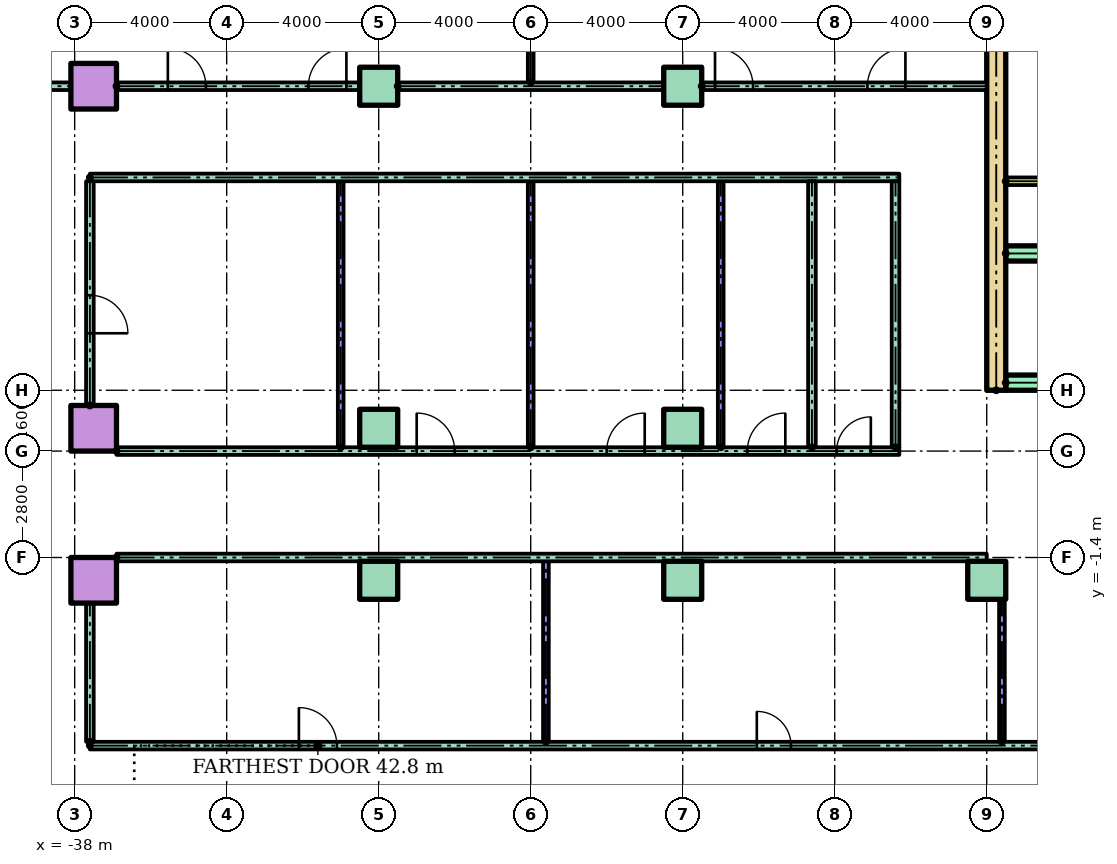
"""IFC4 building model, lengths in metres.
Left out: names, types, materials, properties, quantities, classifications, styles, units other than length and angle.
Written with IfcOpenShell. Run it as: python <this file> out.ifc"""

import sys

from ifc_helpers import new_model, si_unit, direction, frame, frame_2d, origin, origin_2d, place, context, subcontext, project, spatial, rectangle, hollow_rectangle, extrude, element, fill, save


model = new_model("IFC4")
c1 = context("Model", 3, precision=1e-05, world=origin(), true_north=direction((0.0, 1.0)))
c2 = subcontext(c1, "Body", "Model", "MODEL_VIEW")
j1 = project(units=[si_unit("LENGTHUNIT", "METRE"), si_unit("PLANEANGLEUNIT", "RADIAN")], contexts=[c1])
p1 = place(None, origin())
s1 = spatial("IfcSite", under=j1, at=p1, CompositionType="ELEMENT")
p2 = place(p1, origin())
s2 = spatial("IfcBuilding", under=s1, at=p2, CompositionType="ELEMENT")
p3 = place(p2, frame((0.0, 0.0, 22.0)))
s3 = spatial("IfcBuildingStorey", under=s2, at=p3, CompositionType="ELEMENT", Elevation=22.0)
p4 = place(p3, frame((-37.5, -2.0, 0.0)))
e1 = element("IfcColumn", 1, at=p4, inside=s3, PredefinedType="COLUMN", context=c2, shape_type="SweptSolid", body=[
    extrude(hollow_rectangle(XDim=1.2, YDim=1.2, WallThickness=0.06, at=origin_2d()), origin(), (0.0, 0.0, 1.0), 4.0),
])
for number, where in (
    (2, (-30.0, -2.0, 0.0)),
    (3, (-22.0, -2.0, 0.0)),
    (4, (-14.0, -2.0, 0.0)),
):
    element("IfcColumn", number, at=place(p3, frame(where)), inside=s3, PredefinedType="COLUMN", context=c2, shape_type="SweptSolid", body=[
        extrude(rectangle(XDim=1.0, YDim=1.0, at=origin_2d()), origin(), (0.0, 0.0, 1.0), 4.0),
    ])
p5 = place(p3, frame((-37.5, 2.0, 0.0)))
e5 = element("IfcColumn", 5, at=p5, inside=s3, PredefinedType="COLUMN", context=c2, shape_type="SweptSolid", body=[
    extrude(hollow_rectangle(XDim=1.2, YDim=1.2, WallThickness=0.06, at=origin_2d()), origin(), (0.0, 0.0, 1.0), 4.0),
])
for number, where in (
    (6, (-30.0, 2.0, 0.0)),
    (7, (-22.0, 2.0, 0.0)),
):
    element("IfcColumn", number, at=place(p3, frame(where)), inside=s3, PredefinedType="COLUMN", context=c2, shape_type="SweptSolid", body=[
        extrude(rectangle(XDim=1.0, YDim=1.0, at=origin_2d()), origin(), (0.0, 0.0, 1.0), 4.0),
    ])
p6 = place(p3, frame((-37.5, 11.0, 0.0)))
e8 = element("IfcColumn", 8, at=p6, inside=s3, PredefinedType="COLUMN", context=c2, shape_type="SweptSolid", body=[
    extrude(hollow_rectangle(XDim=1.2, YDim=1.2, WallThickness=0.06, at=origin_2d()), origin(), (0.0, 0.0, 1.0), 4.0),
])
for number, where in (
    (9, (-30.0, 11.0, 0.0)),
    (10, (-22.0, 11.0, 0.0)),
):
    element("IfcColumn", number, at=place(p3, frame(where)), inside=s3, PredefinedType="COLUMN", context=c2, shape_type="SweptSolid", body=[
        extrude(rectangle(XDim=1.0, YDim=1.0, at=origin_2d()), origin(), (0.0, 0.0, 1.0), 4.0),
    ])
p7 = place(p3, frame((-13.75, 3.0, 0.0), z_axis=(0.0, 0.0, 1.0), x_axis=(0.0, 1.0, 0.0)))
e11 = element("IfcWall", 11, at=p7, inside=s3, PredefinedType="SHEAR", context=c2, shape_type="SweptSolid", body=[
    extrude(rectangle(XDim=17.0, YDim=0.5, at=frame_2d((8.5, 0.0))), origin(), (0.0, 0.0, 1.0), 3.2),
])
p8 = place(p3, frame((-13.5, 3.2, 0.0)))
e12 = element("IfcWall", 12, at=p8, inside=s3, PredefinedType="SHEAR", context=c2, shape_type="SweptSolid", body=[
    extrude(rectangle(XDim=27.0, YDim=0.4, at=frame_2d((13.5, 0.0))), origin(), (0.0, 0.0, 1.0), 3.2),
])
p9 = place(p8, frame((6.861, 0.0, 0.0)))
e13 = element("IfcOpeningElement", 13, at=p9, cuts=e12, PredefinedType="OPENING", context=c2, shape_type="SweptSolid", body=[
    extrude(rectangle(XDim=1.1, YDim=2.1, at=frame_2d((0.55, 1.05))), frame((0.0, 0.21, 0.0), z_axis=(0.0, -1.0, 0.0), x_axis=(1.0, 0.0, 0.0)), (0.0, 0.0, 1.0), 0.42),
])
p10 = place(p8, frame((9.906, 0.0, 0.0)))
e14 = element("IfcOpeningElement", 14, at=p10, cuts=e12, PredefinedType="OPENING", context=c2, shape_type="SweptSolid", body=[
    extrude(rectangle(XDim=1.1, YDim=2.1, at=frame_2d((0.55, 1.05))), frame((0.0, 0.21, 0.0), z_axis=(0.0, -1.0, 0.0), x_axis=(1.0, 0.0, 0.0)), (0.0, 0.0, 1.0), 0.42),
])
p11 = place(p8, frame((15.994, 0.0, 0.0)))
e15 = element("IfcOpeningElement", 15, at=p11, cuts=e12, PredefinedType="OPENING", context=c2, shape_type="SweptSolid", body=[
    extrude(rectangle(XDim=1.1, YDim=2.1, at=frame_2d((0.55, 1.05))), frame((0.0, 0.21, 0.0), z_axis=(0.0, -1.0, 0.0), x_axis=(1.0, 0.0, 0.0)), (0.0, 0.0, 1.0), 0.42),
])
p12 = place(p8, frame((19.039, 0.0, 0.0)))
e16 = element("IfcOpeningElement", 16, at=p12, cuts=e12, PredefinedType="OPENING", context=c2, shape_type="SweptSolid", body=[
    extrude(rectangle(XDim=1.1, YDim=2.1, at=frame_2d((0.55, 1.05))), frame((0.0, 0.21, 0.0), z_axis=(0.0, -1.0, 0.0), x_axis=(1.0, 0.0, 0.0)), (0.0, 0.0, 1.0), 0.42),
])
p13 = place(p8, frame((12.6, 0.0, 0.0)))
e17 = element("IfcOpeningElement", 17, at=p13, cuts=e12, PredefinedType="OPENING", context=c2, shape_type="SweptSolid", body=[
    extrude(rectangle(XDim=1.8, YDim=2.1, at=frame_2d((0.9, 1.05))), frame((0.0, 0.21, 0.0), z_axis=(0.0, -1.0, 0.0), x_axis=(1.0, 0.0, 0.0)), (0.0, 0.0, 1.0), 0.42),
])
p14 = place(p3, frame((-13.5, 6.6, 0.0)))
e18 = element("IfcWall", 18, at=p14, inside=s3, PredefinedType="SHEAR", context=c2, shape_type="SweptSolid", body=[
    extrude(rectangle(XDim=11.978, YDim=0.4, at=frame_2d((5.989, 0.0))), origin(), (0.0, 0.0, 1.0), 3.2),
])
p15 = place(p3, frame((-13.5, 8.5, 0.0)))
e19 = element("IfcWall", 19, at=p15, inside=s3, PredefinedType="PARTITIONING", context=c2, shape_type="SweptSolid", body=[
    extrude(rectangle(XDim=3.9, YDim=0.2, at=frame_2d((1.95, 0.0))), origin(), (0.0, 0.0, 1.0), 3.2),
])
p16 = place(p3, frame((-37.6, -6.35, 0.0)))
e20 = element("IfcWall", 20, at=p16, inside=s3, PredefinedType="PARTITIONING", context=c2, shape_type="SweptSolid", body=[
    extrude(rectangle(XDim=75.2, YDim=0.2, at=frame_2d((37.6, 0.0))), origin(), (0.0, 0.0, 1.0), 3.2),
])
p17 = place(p16, frame((5.5, 0.0, 0.0)))
e21 = element("IfcOpeningElement", 21, at=p17, cuts=e20, PredefinedType="OPENING", context=c2, shape_type="SweptSolid", body=[
    extrude(rectangle(XDim=1.0, YDim=2.1, at=frame_2d((0.5, 1.05))), frame((0.0, 0.11, 0.0), z_axis=(0.0, -1.0, 0.0), x_axis=(1.0, 0.0, 0.0)), (0.0, 0.0, 1.0), 0.22),
])
p18 = place(p16, frame((17.55, 0.0, 0.0)))
e22 = element("IfcOpeningElement", 22, at=p18, cuts=e20, PredefinedType="OPENING", context=c2, shape_type="SweptSolid", body=[
    extrude(rectangle(XDim=0.9, YDim=2.1, at=frame_2d((0.45, 1.05))), frame((0.0, 0.11, 0.0), z_axis=(0.0, -1.0, 0.0), x_axis=(1.0, 0.0, 0.0)), (0.0, 0.0, 1.0), 0.22),
])
p19 = place(p16, frame((29.55, 0.0, 0.0)))
e23 = element("IfcOpeningElement", 23, at=p19, cuts=e20, PredefinedType="OPENING", context=c2, shape_type="SweptSolid", body=[
    extrude(rectangle(XDim=0.9, YDim=2.1, at=frame_2d((0.45, 1.05))), frame((0.0, 0.11, 0.0), z_axis=(0.0, -1.0, 0.0), x_axis=(1.0, 0.0, 0.0)), (0.0, 0.0, 1.0), 0.22),
])
p20 = place(p16, frame((40.5, 0.0, 0.0)))
e24 = element("IfcOpeningElement", 24, at=p20, cuts=e20, PredefinedType="OPENING", context=c2, shape_type="SweptSolid", body=[
    extrude(rectangle(XDim=1.0, YDim=2.1, at=frame_2d((0.5, 1.05))), frame((0.0, 0.11, 0.0), z_axis=(0.0, -1.0, 0.0), x_axis=(1.0, 0.0, 0.0)), (0.0, 0.0, 1.0), 0.22),
])
p21 = place(p16, frame((60.1, 0.0, 0.0)))
e25 = element("IfcOpeningElement", 25, at=p21, cuts=e20, PredefinedType="OPENING", context=c2, shape_type="SweptSolid", body=[
    extrude(rectangle(XDim=1.0, YDim=2.1, at=frame_2d((0.5, 1.05))), frame((0.0, 0.11, 0.0), z_axis=(0.0, -1.0, 0.0), x_axis=(1.0, 0.0, 0.0)), (0.0, 0.0, 1.0), 0.22),
])
p22 = place(p3, frame((-36.9, -1.4, 0.0)))
e26 = element("IfcWall", 26, at=p22, inside=s3, PredefinedType="PARTITIONING", context=c2, shape_type="SweptSolid", body=[
    extrude(rectangle(XDim=22.9, YDim=0.2, at=frame_2d((11.45, 0.0))), origin(), (0.0, 0.0, 1.0), 3.2),
])
p23 = place(p3, frame((-36.9, 1.4, 0.0)))
e27 = element("IfcWall", 27, at=p23, inside=s3, PredefinedType="PARTITIONING", context=c2, shape_type="SweptSolid", body=[
    extrude(rectangle(XDim=20.6, YDim=0.2, at=frame_2d((10.3, 0.0))), origin(), (0.0, 0.0, 1.0), 3.2),
])
p24 = place(p23, frame((7.9, 0.0, 0.0)))
e28 = element("IfcOpeningElement", 28, at=p24, cuts=e27, PredefinedType="OPENING", context=c2, shape_type="SweptSolid", body=[
    extrude(rectangle(XDim=1.0, YDim=2.1, at=frame_2d((0.5, 1.05))), frame((0.0, 0.11, 0.0), z_axis=(0.0, -1.0, 0.0), x_axis=(1.0, 0.0, 0.0)), (0.0, 0.0, 1.0), 0.22),
])
p25 = place(p23, frame((12.9, 0.0, 0.0)))
e29 = element("IfcOpeningElement", 29, at=p25, cuts=e27, PredefinedType="OPENING", context=c2, shape_type="SweptSolid", body=[
    extrude(rectangle(XDim=1.0, YDim=2.1, at=frame_2d((0.5, 1.05))), frame((0.0, 0.11, 0.0), z_axis=(0.0, -1.0, 0.0), x_axis=(1.0, 0.0, 0.0)), (0.0, 0.0, 1.0), 0.22),
])
p26 = place(p23, frame((16.6, 0.0, 0.0)))
e30 = element("IfcOpeningElement", 30, at=p26, cuts=e27, PredefinedType="OPENING", context=c2, shape_type="SweptSolid", body=[
    extrude(rectangle(XDim=1.0, YDim=2.1, at=frame_2d((0.5, 1.05))), frame((0.0, 0.11, 0.0), z_axis=(0.0, -1.0, 0.0), x_axis=(1.0, 0.0, 0.0)), (0.0, 0.0, 1.0), 0.22),
])
p27 = place(p23, frame((18.95, 0.0, 0.0)))
e31 = element("IfcOpeningElement", 31, at=p27, cuts=e27, PredefinedType="OPENING", context=c2, shape_type="SweptSolid", body=[
    extrude(rectangle(XDim=0.9, YDim=2.1, at=frame_2d((0.45, 1.05))), frame((0.0, 0.11, 0.0), z_axis=(0.0, -1.0, 0.0), x_axis=(1.0, 0.0, 0.0)), (0.0, 0.0, 1.0), 0.22),
])
p28 = place(p3, frame((-37.6, 8.6, 0.0)))
e32 = element("IfcWall", 32, at=p28, inside=s3, PredefinedType="PARTITIONING", context=c2, shape_type="SweptSolid", body=[
    extrude(rectangle(XDim=21.3, YDim=0.2, at=frame_2d((10.65, 0.0))), origin(), (0.0, 0.0, 1.0), 3.2),
])
p29 = place(p3, frame((-39.6, 11.0, 0.0)))
e33 = element("IfcWall", 33, at=p29, inside=s3, PredefinedType="PARTITIONING", context=c2, shape_type="SweptSolid", body=[
    extrude(rectangle(XDim=1.5, YDim=0.2, at=frame_2d((0.75, 0.0))), origin(), (0.0, 0.0, 1.0), 3.2),
])
p30 = place(p3, frame((-36.9, 11.0, 0.0)))
e34 = element("IfcWall", 34, at=p30, inside=s3, PredefinedType="PARTITIONING", context=c2, shape_type="SweptSolid", body=[
    extrude(rectangle(XDim=6.4, YDim=0.2, at=frame_2d((3.2, 0.0))), origin(), (0.0, 0.0, 1.0), 3.2),
])
p31 = place(p30, frame((1.352, 0.0, 0.0)))
e35 = element("IfcOpeningElement", 35, at=p31, cuts=e34, PredefinedType="OPENING", context=c2, shape_type="SweptSolid", body=[
    extrude(rectangle(XDim=1.0, YDim=2.1, at=frame_2d((0.5, 1.05))), frame((0.0, 0.11, 0.0), z_axis=(0.0, -1.0, 0.0), x_axis=(1.0, 0.0, 0.0)), (0.0, 0.0, 1.0), 0.22),
])
p32 = place(p30, frame((5.05, 0.0, 0.0)))
e36 = element("IfcOpeningElement", 36, at=p32, cuts=e34, PredefinedType="OPENING", context=c2, shape_type="SweptSolid", body=[
    extrude(rectangle(XDim=1.0, YDim=2.1, at=frame_2d((0.5, 1.05))), frame((0.0, 0.11, 0.0), z_axis=(0.0, -1.0, 0.0), x_axis=(1.0, 0.0, 0.0)), (0.0, 0.0, 1.0), 0.22),
])
p33 = place(p3, frame((-29.5, 11.0, 0.0)))
e37 = element("IfcWall", 37, at=p33, inside=s3, PredefinedType="PARTITIONING", context=c2, shape_type="SweptSolid", body=[
    extrude(rectangle(XDim=7.0, YDim=0.2, at=frame_2d((3.5, 0.0))), origin(), (0.0, 0.0, 1.0), 3.2),
])
p34 = place(p3, frame((-21.5, 11.0, 0.0)))
e38 = element("IfcWall", 38, at=p34, inside=s3, PredefinedType="PARTITIONING", context=c2, shape_type="SweptSolid", body=[
    extrude(rectangle(XDim=7.5, YDim=0.2, at=frame_2d((3.75, 0.0))), origin(), (0.0, 0.0, 1.0), 3.2),
])
p35 = place(p34, frame((0.35, 0.0, 0.0)))
e39 = element("IfcOpeningElement", 39, at=p35, cuts=e38, PredefinedType="OPENING", context=c2, shape_type="SweptSolid", body=[
    extrude(rectangle(XDim=1.0, YDim=2.1, at=frame_2d((0.5, 1.05))), frame((0.0, 0.11, 0.0), z_axis=(0.0, -1.0, 0.0), x_axis=(1.0, 0.0, 0.0)), (0.0, 0.0, 1.0), 0.22),
])
p36 = place(p34, frame((4.36, 0.0, 0.0)))
e40 = element("IfcOpeningElement", 40, at=p36, cuts=e38, PredefinedType="OPENING", context=c2, shape_type="SweptSolid", body=[
    extrude(rectangle(XDim=1.0, YDim=2.1, at=frame_2d((0.5, 1.05))), frame((0.0, 0.11, 0.0), z_axis=(0.0, -1.0, 0.0), x_axis=(1.0, 0.0, 0.0)), (0.0, 0.0, 1.0), 0.22),
])
p37 = place(p3, frame((-37.6, -6.25, 0.0), z_axis=(0.0, 0.0, 1.0), x_axis=(0.0, 1.0, 0.0)))
e41 = element("IfcWall", 41, at=p37, inside=s3, PredefinedType="PARTITIONING", context=c2, shape_type="SweptSolid", body=[
    extrude(rectangle(XDim=3.65, YDim=0.2, at=frame_2d((1.825, 0.0))), origin(), (0.0, 0.0, 1.0), 3.2),
])
p38 = place(p3, frame((-37.6, 2.6, 0.0), z_axis=(0.0, 0.0, 1.0), x_axis=(0.0, 1.0, 0.0)))
e42 = element("IfcWall", 42, at=p38, inside=s3, PredefinedType="PARTITIONING", context=c2, shape_type="SweptSolid", body=[
    extrude(rectangle(XDim=5.9, YDim=0.2, at=frame_2d((2.95, 0.0))), origin(), (0.0, 0.0, 1.0), 3.2),
])
p39 = place(p38, frame((1.9, 0.0, 0.0)))
e43 = element("IfcOpeningElement", 43, at=p39, cuts=e42, PredefinedType="OPENING", context=c2, shape_type="SweptSolid", body=[
    extrude(rectangle(XDim=1.0, YDim=2.1, at=frame_2d((0.5, 1.05))), frame((0.0, 0.11, 0.0), z_axis=(0.0, -1.0, 0.0), x_axis=(1.0, 0.0, 0.0)), (0.0, 0.0, 1.0), 0.22),
])
for number, where, z_axis, x_axis in (
    (44, (-31.0, 1.5, 0.0), (0.0, 0.0, 1.0), (0.0, 1.0, 0.0)),
    (45, (-26.0, 1.5, 0.0), (0.0, 0.0, 1.0), (0.0, 1.0, 0.0)),
):
    element("IfcWall", number, at=place(p3, frame(where, z_axis=z_axis, x_axis=x_axis)), inside=s3, PredefinedType="PARTITIONING", context=c2, shape_type="SweptSolid", body=[
        extrude(rectangle(XDim=7.0, YDim=0.15, at=frame_2d((3.5, 0.0))), origin(), (0.0, 0.0, 1.0), 3.2),
    ])
p40 = place(p3, frame((-26.0, 11.1, 0.0), z_axis=(0.0, 0.0, 1.0), x_axis=(0.0, 1.0, 0.0)))
e46 = element("IfcWall", 46, at=p40, inside=s3, PredefinedType="PARTITIONING", context=c2, shape_type="SweptSolid", body=[
    extrude(rectangle(XDim=8.5, YDim=0.15, at=frame_2d((4.25, 0.0))), origin(), (0.0, 0.0, 1.0), 3.2),
])
p41 = place(p3, frame((-25.6, -6.25, 0.0), z_axis=(0.0, 0.0, 1.0), x_axis=(0.0, 1.0, 0.0)))
e47 = element("IfcWall", 47, at=p41, inside=s3, PredefinedType="PARTITIONING", context=c2, shape_type="SweptSolid", body=[
    extrude(rectangle(XDim=4.75, YDim=0.15, at=frame_2d((2.375, 0.0))), origin(), (0.0, 0.0, 1.0), 3.2),
])
p42 = place(p3, frame((-21.0, 1.5, 0.0), z_axis=(0.0, 0.0, 1.0), x_axis=(0.0, 1.0, 0.0)))
e48 = element("IfcWall", 48, at=p42, inside=s3, PredefinedType="PARTITIONING", context=c2, shape_type="SweptSolid", body=[
    extrude(rectangle(XDim=7.0, YDim=0.15, at=frame_2d((3.5, 0.0))), origin(), (0.0, 0.0, 1.0), 3.2),
])
for number, where, z_axis, x_axis in (
    (49, (-18.6, 1.5, 0.0), (0.0, 0.0, 1.0), (0.0, 1.0, 0.0)),
    (50, (-16.4, 1.5, 0.0), (0.0, 0.0, 1.0), (0.0, 1.0, 0.0)),
):
    element("IfcWall", number, at=place(p3, frame(where, z_axis=z_axis, x_axis=x_axis)), inside=s3, PredefinedType="PARTITIONING", context=c2, shape_type="SweptSolid", body=[
        extrude(rectangle(XDim=7.0, YDim=0.2, at=frame_2d((3.5, 0.0))), origin(), (0.0, 0.0, 1.0), 3.2),
    ])
p43 = place(p3, frame((-13.6, -6.25, 0.0), z_axis=(0.0, 0.0, 1.0), x_axis=(0.0, 1.0, 0.0)))
e51 = element("IfcWall", 51, at=p43, inside=s3, PredefinedType="PARTITIONING", context=c2, shape_type="SweptSolid", body=[
    extrude(rectangle(XDim=3.75, YDim=0.15, at=frame_2d((1.875, 0.0))), origin(), (0.0, 0.0, 1.0), 3.2),
])
p44 = place(p17, origin())
e52 = element("IfcDoor", 52, at=p44, inside=s3, OperationType="SINGLE_SWING_LEFT", PredefinedType="DOOR", context=c2, shape_type="SweptSolid", body=[
    extrude(rectangle(XDim=1.0, YDim=2.1, at=frame_2d((0.5, 1.05))), frame((0.0, 0.025, 0.0), z_axis=(0.0, -1.0, 0.0), x_axis=(1.0, 0.0, 0.0)), (0.0, 0.0, 1.0), 0.05),
])
fill(e21, e52)
p45 = place(p18, origin())
e53 = element("IfcDoor", 53, at=p45, inside=s3, OperationType="SINGLE_SWING_LEFT", PredefinedType="DOOR", context=c2, shape_type="SweptSolid", body=[
    extrude(rectangle(XDim=0.9, YDim=2.1, at=frame_2d((0.45, 1.05))), frame((0.0, 0.025, 0.0), z_axis=(0.0, -1.0, 0.0), x_axis=(1.0, 0.0, 0.0)), (0.0, 0.0, 1.0), 0.05),
])
fill(e22, e53)
p46 = place(p39, frame((1.0, 0.0, 0.0), z_axis=(0.0, 0.0, 1.0), x_axis=(-1.0, 0.0, 0.0)))
e54 = element("IfcDoor", 54, at=p46, inside=s3, OperationType="SINGLE_SWING_LEFT", PredefinedType="DOOR", context=c2, shape_type="SweptSolid", body=[
    extrude(rectangle(XDim=1.0, YDim=2.1, at=frame_2d((0.5, 1.05))), frame((0.0, 0.025, 0.0), z_axis=(0.0, -1.0, 0.0), x_axis=(1.0, 0.0, 0.0)), (0.0, 0.0, 1.0), 0.05),
])
fill(e43, e54)
p47 = place(p24, origin())
e55 = element("IfcDoor", 55, at=p47, inside=s3, OperationType="SINGLE_SWING_LEFT", PredefinedType="DOOR", context=c2, shape_type="SweptSolid", body=[
    extrude(rectangle(XDim=1.0, YDim=2.1, at=frame_2d((0.5, 1.05))), frame((0.0, 0.025, 0.0), z_axis=(0.0, -1.0, 0.0), x_axis=(1.0, 0.0, 0.0)), (0.0, 0.0, 1.0), 0.05),
])
fill(e28, e55)
p48 = place(p25, origin())
e56 = element("IfcDoor", 56, at=p48, inside=s3, OperationType="SINGLE_SWING_RIGHT", PredefinedType="DOOR", context=c2, shape_type="SweptSolid", body=[
    extrude(rectangle(XDim=1.0, YDim=2.1, at=frame_2d((0.5, 1.05))), frame((0.0, 0.025, 0.0), z_axis=(0.0, -1.0, 0.0), x_axis=(1.0, 0.0, 0.0)), (0.0, 0.0, 1.0), 0.05),
])
fill(e29, e56)
p49 = place(p26, origin())
e57 = element("IfcDoor", 57, at=p49, inside=s3, OperationType="SINGLE_SWING_RIGHT", PredefinedType="DOOR", context=c2, shape_type="SweptSolid", body=[
    extrude(rectangle(XDim=1.0, YDim=2.1, at=frame_2d((0.5, 1.05))), frame((0.0, 0.025, 0.0), z_axis=(0.0, -1.0, 0.0), x_axis=(1.0, 0.0, 0.0)), (0.0, 0.0, 1.0), 0.05),
])
fill(e30, e57)
p50 = place(p27, origin())
e58 = element("IfcDoor", 58, at=p50, inside=s3, OperationType="SINGLE_SWING_RIGHT", PredefinedType="DOOR", context=c2, shape_type="SweptSolid", body=[
    extrude(rectangle(XDim=0.9, YDim=2.1, at=frame_2d((0.45, 1.05))), frame((0.0, 0.025, 0.0), z_axis=(0.0, -1.0, 0.0), x_axis=(1.0, 0.0, 0.0)), (0.0, 0.0, 1.0), 0.05),
])
fill(e31, e58)
p51 = place(p31, origin())
e59 = element("IfcDoor", 59, at=p51, inside=s3, OperationType="SINGLE_SWING_LEFT", PredefinedType="DOOR", context=c2, shape_type="SweptSolid", body=[
    extrude(rectangle(XDim=1.0, YDim=2.1, at=frame_2d((0.5, 1.05))), frame((0.0, 0.025, 0.0), z_axis=(0.0, -1.0, 0.0), x_axis=(1.0, 0.0, 0.0)), (0.0, 0.0, 1.0), 0.05),
])
fill(e35, e59)
p52 = place(p32, origin())
e60 = element("IfcDoor", 60, at=p52, inside=s3, OperationType="SINGLE_SWING_RIGHT", PredefinedType="DOOR", context=c2, shape_type="SweptSolid", body=[
    extrude(rectangle(XDim=1.0, YDim=2.1, at=frame_2d((0.5, 1.05))), frame((0.0, 0.025, 0.0), z_axis=(0.0, -1.0, 0.0), x_axis=(1.0, 0.0, 0.0)), (0.0, 0.0, 1.0), 0.05),
])
fill(e36, e60)
p53 = place(p35, origin())
e61 = element("IfcDoor", 61, at=p53, inside=s3, OperationType="SINGLE_SWING_LEFT", PredefinedType="DOOR", context=c2, shape_type="SweptSolid", body=[
    extrude(rectangle(XDim=1.0, YDim=2.1, at=frame_2d((0.5, 1.05))), frame((0.0, 0.025, 0.0), z_axis=(0.0, -1.0, 0.0), x_axis=(1.0, 0.0, 0.0)), (0.0, 0.0, 1.0), 0.05),
])
fill(e39, e61)
p54 = place(p36, origin())
e62 = element("IfcDoor", 62, at=p54, inside=s3, OperationType="SINGLE_SWING_RIGHT", PredefinedType="DOOR", context=c2, shape_type="SweptSolid", body=[
    extrude(rectangle(XDim=1.0, YDim=2.1, at=frame_2d((0.5, 1.05))), frame((0.0, 0.025, 0.0), z_axis=(0.0, -1.0, 0.0), x_axis=(1.0, 0.0, 0.0)), (0.0, 0.0, 1.0), 0.05),
])
fill(e40, e62)
save(model, sys.argv[1])
